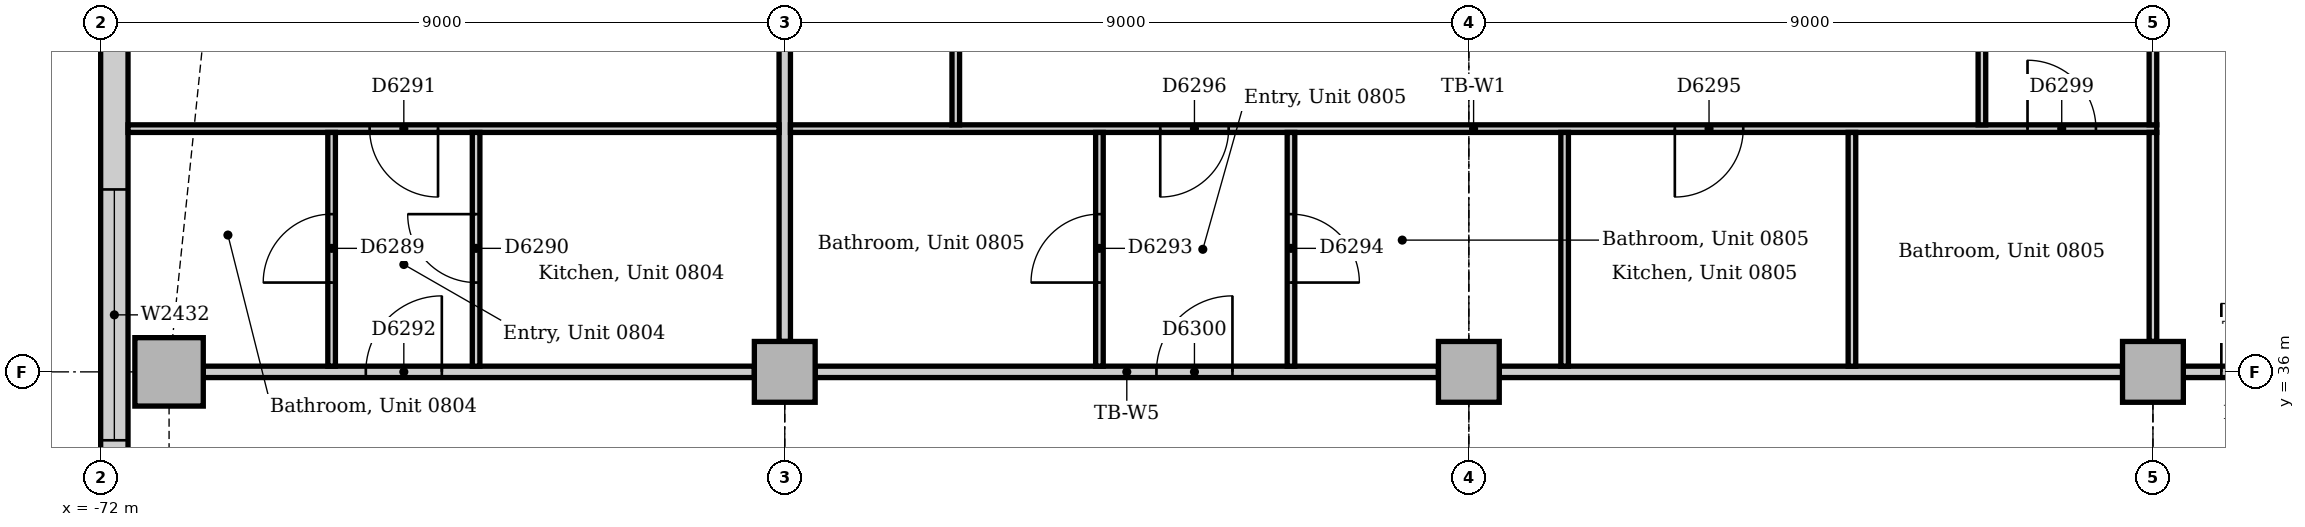
"""IFC4 building model, lengths in metres.
Left out: names, types, materials, properties, quantities, classifications, styles, units other than length and angle.
Written with IfcOpenShell. Run it as: python <this file> out.ifc"""

import sys

from ifc_helpers import new_model, si_unit, direction, frame, frame_2d, origin, origin_2d, place, context, subcontext, project, spatial, rectangle, extrude, element, fill, save


model = new_model("IFC4")
c1 = context("Model", 3, precision=1e-05, world=origin(), true_north=direction((0.0, 1.0)))
c2 = subcontext(c1, "Body", "Model", "MODEL_VIEW")
j1 = project(units=[si_unit("LENGTHUNIT", "METRE"), si_unit("PLANEANGLEUNIT", "RADIAN")], contexts=[c1])
p1 = place(None, origin())
s1 = spatial("IfcSite", under=j1, at=p1, CompositionType="ELEMENT")
p2 = place(p1, origin())
s2 = spatial("IfcBuilding", under=s1, at=p2, CompositionType="ELEMENT")
p3 = place(p2, frame((0.0, 0.0, 38.0)))
s3 = spatial("IfcBuildingStorey", under=s2, at=p3, CompositionType="ELEMENT", Elevation=38.0)
p4 = place(p3, frame((-71.1, 36.0, 0.0), z_axis=(0.0, 0.0, 1.0), x_axis=(1.0, 0.0, 0.0)))
e1 = element("IfcColumn", 1, at=p4, inside=s3, PredefinedType="COLUMN", context=c2, shape_type="SweptSolid", body=[
    extrude(rectangle(XDim=0.9, YDim=0.9, at=origin_2d()), origin(), (0.0, 0.0, 1.0), 3.85),
])
for number, where, z_axis, x_axis in (
    (2, (-63.0, 36.0, 0.0), (0.0, 0.0, 1.0), (1.0, 0.0, 0.0)),
    (3, (-54.0, 36.0, 0.0), (0.0, 0.0, 1.0), (1.0, 0.0, 0.0)),
    (4, (-45.0, 36.0, 0.0), (0.0, 0.0, 1.0), (1.0, 0.0, 0.0)),
):
    element("IfcColumn", number, at=place(p3, frame(where, z_axis=z_axis, x_axis=x_axis)), inside=s3, PredefinedType="COLUMN", context=c2, shape_type="SweptSolid", body=[
        extrude(rectangle(XDim=0.8, YDim=0.8, at=origin_2d()), origin(), (0.0, 0.0, 1.0), 3.85),
    ])
p5 = place(p3, frame((-71.82, 40.757, 0.0), z_axis=(0.0, 0.0, 1.0), x_axis=(0.0, -1.0, 0.0)))
e5 = element("IfcWall", 5, at=p5, inside=s3, PredefinedType="STANDARD", context=c2, shape_type="SweptSolid", body=[
    extrude(rectangle(XDim=26.015, YDim=0.36, at=frame_2d((13.007, 0.0))), origin(), (0.0, 0.0, 1.0), 3.85),
])
p6 = place(p5, frame((2.357, 0.0, 0.9)))
e6 = element("IfcOpeningElement", 6, at=p6, cuts=e5, PredefinedType="OPENING", context=c2, shape_type="SweptSolid", body=[
    extrude(rectangle(XDim=3.3, YDim=1.6, at=frame_2d((1.65, 0.8))), frame((0.0, 0.19, 0.0), z_axis=(0.0, -1.0, 0.0), x_axis=(1.0, 0.0, 0.0)), (0.0, 0.0, 1.0), 0.38),
])
p7 = place(p5, frame((7.057, 0.0, 0.9)))
e7 = element("IfcOpeningElement", 7, at=p7, cuts=e5, PredefinedType="OPENING", context=c2, shape_type="SweptSolid", body=[
    extrude(rectangle(XDim=3.3, YDim=1.6, at=frame_2d((1.65, 0.8))), frame((0.0, 0.19, 0.0), z_axis=(0.0, -1.0, 0.0), x_axis=(1.0, 0.0, 0.0)), (0.0, 0.0, 1.0), 0.38),
])
p8 = place(p5, frame((11.357, 0.0, 0.9)))
e8 = element("IfcOpeningElement", 8, at=p8, cuts=e5, PredefinedType="OPENING", context=c2, shape_type="SweptSolid", body=[
    extrude(rectangle(XDim=3.3, YDim=1.6, at=frame_2d((1.65, 0.8))), frame((0.0, 0.19, 0.0), z_axis=(0.0, -1.0, 0.0), x_axis=(1.0, 0.0, 0.0)), (0.0, 0.0, 1.0), 0.38),
])
p9 = place(p5, frame((15.857, 0.0, 0.9)))
e9 = element("IfcOpeningElement", 9, at=p9, cuts=e5, PredefinedType="OPENING", context=c2, shape_type="SweptSolid", body=[
    extrude(rectangle(XDim=3.3, YDim=1.6, at=frame_2d((1.65, 0.8))), frame((0.0, 0.19, 0.0), z_axis=(0.0, -1.0, 0.0), x_axis=(1.0, 0.0, 0.0)), (0.0, 0.0, 1.0), 0.38),
])
p10 = place(p5, frame((20.957, 0.0, 0.9)))
e10 = element("IfcOpeningElement", 10, at=p10, cuts=e5, PredefinedType="OPENING", context=c2, shape_type="SweptSolid", body=[
    extrude(rectangle(XDim=3.3, YDim=1.6, at=frame_2d((1.65, 0.8))), frame((0.0, 0.19, 0.0), z_axis=(0.0, -1.0, 0.0), x_axis=(1.0, 0.0, 0.0)), (0.0, 0.0, 1.0), 0.38),
])
p11 = place(p3, frame((-44.6, 36.0, 0.0), z_axis=(0.0, 0.0, 1.0), x_axis=(1.0, 0.0, 0.0)))
e11 = element("IfcWall", 11, at=p11, inside=s3, PredefinedType="PARTITIONING", context=c2, shape_type="SweptSolid", body=[
    extrude(rectangle(XDim=1.875, YDim=0.15, at=frame_2d((0.938, 0.0))), origin(), (0.0, 0.0, 1.0), 3.602),
])
p12 = place(p11, frame((0.5, 0.0, 0.0)))
e12 = element("IfcOpeningElement", 12, at=p12, cuts=e11, PredefinedType="OPENING", context=c2, shape_type="SweptSolid", body=[
    extrude(rectangle(XDim=0.9, YDim=2.1, at=frame_2d((0.45, 1.05))), frame((0.0, 0.085, 0.0), z_axis=(0.0, -1.0, 0.0), x_axis=(1.0, 0.0, 0.0)), (0.0, 0.0, 1.0), 0.17),
])
p13 = place(p3, frame((-53.6, 36.0, 0.0), z_axis=(0.0, 0.0, 1.0), x_axis=(1.0, 0.0, 0.0)))
e13 = element("IfcWall", 13, at=p13, inside=s3, PredefinedType="PARTITIONING", context=c2, shape_type="SweptSolid", body=[
    extrude(rectangle(XDim=8.2, YDim=0.15, at=frame_2d((4.1, 0.0))), origin(), (0.0, 0.0, 1.0), 3.15),
])
p14 = place(p3, frame((-62.6, 36.0, 0.0), z_axis=(0.0, 0.0, 1.0), x_axis=(1.0, 0.0, 0.0)))
e14 = element("IfcWall", 14, at=p14, inside=s3, PredefinedType="PARTITIONING", context=c2, shape_type="SweptSolid", body=[
    extrude(rectangle(XDim=8.2, YDim=0.15, at=frame_2d((4.1, 0.0))), origin(), (0.0, 0.0, 1.0), 3.15),
])
p15 = place(p14, frame((4.49, 0.0, 0.0)))
e15 = element("IfcOpeningElement", 15, at=p15, cuts=e14, PredefinedType="OPENING", context=c2, shape_type="SweptSolid", body=[
    extrude(rectangle(XDim=1.0, YDim=2.1, at=frame_2d((0.5, 1.05))), frame((0.0, 0.085, 0.0), z_axis=(0.0, -1.0, 0.0), x_axis=(1.0, 0.0, 0.0)), (0.0, 0.0, 1.0), 0.17),
])
p16 = place(p3, frame((-70.65, 36.0, 0.0), z_axis=(0.0, 0.0, 1.0), x_axis=(1.0, 0.0, 0.0)))
e16 = element("IfcWall", 16, at=p16, inside=s3, PredefinedType="PARTITIONING", context=c2, shape_type="SweptSolid", body=[
    extrude(rectangle(XDim=7.25, YDim=0.15, at=frame_2d((3.625, 0.0))), origin(), (0.0, 0.0, 1.0), 3.15),
])
p17 = place(p16, frame((2.138, 0.0, 0.0)))
e17 = element("IfcOpeningElement", 17, at=p17, cuts=e16, PredefinedType="OPENING", context=c2, shape_type="SweptSolid", body=[
    extrude(rectangle(XDim=1.0, YDim=2.1, at=frame_2d((0.5, 1.05))), frame((0.0, 0.085, 0.0), z_axis=(0.0, -1.0, 0.0), x_axis=(1.0, 0.0, 0.0)), (0.0, 0.0, 1.0), 0.17),
])
p18 = place(p3, frame((-63.0, 36.4, 0.0), z_axis=(0.0, 0.0, 1.0), x_axis=(0.0, 1.0, 0.0)))
e18 = element("IfcWall", 18, at=p18, inside=s3, PredefinedType="PARTITIONING", context=c2, shape_type="SweptSolid", body=[
    extrude(rectangle(XDim=7.25, YDim=0.15, at=frame_2d((3.625, 0.0))), origin(), (0.0, 0.0, 1.0), 3.158),
])
p19 = place(p3, frame((-62.925, 39.2, 0.0), z_axis=(0.0, 0.0, 1.0), x_axis=(1.0, 0.0, 0.0)))
e19 = element("IfcWall", 19, at=p19, inside=s3, PredefinedType="PARTITIONING", context=c2, shape_type="SweptSolid", body=[
    extrude(rectangle(XDim=17.975, YDim=0.1, at=frame_2d((8.988, 0.0))), origin(), (0.0, 0.0, 1.0), 3.85),
])
p20 = place(p19, frame((11.635, 0.0, 0.0)))
e20 = element("IfcOpeningElement", 20, at=p20, cuts=e19, PredefinedType="OPENING", context=c2, shape_type="SweptSolid", body=[
    extrude(rectangle(XDim=0.9, YDim=2.1, at=frame_2d((0.45, 1.05))), frame((0.0, 0.06, 0.0), z_axis=(0.0, -1.0, 0.0), x_axis=(1.0, 0.0, 0.0)), (0.0, 0.0, 1.0), 0.12),
])
p21 = place(p19, frame((4.865, 0.0, 0.0)))
e21 = element("IfcOpeningElement", 21, at=p21, cuts=e19, PredefinedType="OPENING", context=c2, shape_type="SweptSolid", body=[
    extrude(rectangle(XDim=0.9, YDim=2.1, at=frame_2d((0.45, 1.05))), frame((0.0, 0.06, 0.0), z_axis=(0.0, -1.0, 0.0), x_axis=(1.0, 0.0, 0.0)), (0.0, 0.0, 1.0), 0.12),
])
p22 = place(p19, frame((16.275, 0.0, 0.0)))
e22 = element("IfcOpeningElement", 22, at=p22, cuts=e19, PredefinedType="OPENING", context=c2, shape_type="SweptSolid", body=[
    extrude(rectangle(XDim=0.9, YDim=2.1, at=frame_2d((0.45, 1.05))), frame((0.0, 0.06, 0.0), z_axis=(0.0, -1.0, 0.0), x_axis=(1.0, 0.0, 0.0)), (0.0, 0.0, 1.0), 0.12),
])
p23 = place(p3, frame((-71.64, 39.2, 0.0), z_axis=(0.0, 0.0, 1.0), x_axis=(1.0, 0.0, 0.0)))
e23 = element("IfcWall", 23, at=p23, inside=s3, PredefinedType="PARTITIONING", context=c2, shape_type="SweptSolid", body=[
    extrude(rectangle(XDim=8.565, YDim=0.1, at=frame_2d((4.282, 0.0))), origin(), (0.0, 0.0, 1.0), 3.85),
])
p24 = place(p23, frame((3.178, 0.0, 0.0)))
e24 = element("IfcOpeningElement", 24, at=p24, cuts=e23, PredefinedType="OPENING", context=c2, shape_type="SweptSolid", body=[
    extrude(rectangle(XDim=0.9, YDim=2.1, at=frame_2d((0.45, 1.05))), frame((0.0, 0.06, 0.0), z_axis=(0.0, -1.0, 0.0), x_axis=(1.0, 0.0, 0.0)), (0.0, 0.0, 1.0), 0.12),
])
p25 = place(p3, frame((-45.0, 39.25, 0.0), z_axis=(0.0, 0.0, 1.0), x_axis=(0.0, 1.0, 0.0)))
e25 = element("IfcWall", 25, at=p25, inside=s3, PredefinedType="PARTITIONING", context=c2, shape_type="SweptSolid", body=[
    extrude(rectangle(XDim=4.4, YDim=0.1, at=frame_2d((2.2, 0.0))), origin(), (0.0, 0.0, 1.0), 3.158),
])
p26 = place(p3, frame((-45.0, 36.4, 0.0), z_axis=(0.0, 0.0, 1.0), x_axis=(0.0, 1.0, 0.0)))
e26 = element("IfcWall", 26, at=p26, inside=s3, PredefinedType="PARTITIONING", context=c2, shape_type="SweptSolid", body=[
    extrude(rectangle(XDim=2.75, YDim=0.1, at=frame_2d((1.375, 0.0))), origin(), (0.0, 0.0, 1.0), 3.158),
])
p27 = place(p3, frame((-60.75, 39.25, 0.0), z_axis=(0.0, 0.0, 1.0), x_axis=(0.0, 1.0, 0.0)))
e27 = element("IfcWall", 27, at=p27, inside=s3, PredefinedType="PARTITIONING", context=c2, shape_type="SweptSolid", body=[
    extrude(rectangle(XDim=5.39, YDim=0.1, at=frame_2d((2.695, 0.0))), origin(), (0.0, 0.0, 1.0), 3.85),
])
p28 = place(p27, frame((2.25, 0.0, 0.0)))
e28 = element("IfcOpeningElement", 28, at=p28, cuts=e27, PredefinedType="OPENING", context=c2, shape_type="SweptSolid", body=[
    extrude(rectangle(XDim=0.9, YDim=2.1, at=frame_2d((0.45, 1.05))), frame((0.0, 0.06, 0.0), z_axis=(0.0, -1.0, 0.0), x_axis=(1.0, 0.0, 0.0)), (0.0, 0.0, 1.0), 0.12),
])
p29 = place(p3, frame((-47.25, 39.25, 0.0), z_axis=(0.0, 0.0, 1.0), x_axis=(0.0, 1.0, 0.0)))
e29 = element("IfcWall", 29, at=p29, inside=s3, PredefinedType="PARTITIONING", context=c2, shape_type="SweptSolid", body=[
    extrude(rectangle(XDim=5.39, YDim=0.1, at=frame_2d((2.695, 0.0))), origin(), (0.0, 0.0, 1.0), 3.85),
])
p30 = place(p29, frame((2.25, 0.0, 0.0)))
e30 = element("IfcOpeningElement", 30, at=p30, cuts=e29, PredefinedType="OPENING", context=c2, shape_type="SweptSolid", body=[
    extrude(rectangle(XDim=0.9, YDim=2.1, at=frame_2d((0.45, 1.05))), frame((0.0, 0.06, 0.0), z_axis=(0.0, -1.0, 0.0), x_axis=(1.0, 0.0, 0.0)), (0.0, 0.0, 1.0), 0.12),
])
p31 = place(p3, frame((-68.962, 36.075, 0.0), z_axis=(0.0, 0.0, 1.0), x_axis=(0.0, 1.0, 0.0)))
e31 = element("IfcWall", 31, at=p31, inside=s3, PredefinedType="PARTITIONING", context=c2, shape_type="SweptSolid", body=[
    extrude(rectangle(XDim=3.075, YDim=0.1, at=frame_2d((1.538, 0.0))), origin(), (0.0, 0.0, 1.0), 3.85),
])
p32 = place(p31, frame((1.1, 0.0, 0.0)))
e32 = element("IfcOpeningElement", 32, at=p32, cuts=e31, PredefinedType="OPENING", context=c2, shape_type="SweptSolid", body=[
    extrude(rectangle(XDim=0.9, YDim=2.1, at=frame_2d((0.45, 1.05))), frame((0.0, 0.06, 0.0), z_axis=(0.0, -1.0, 0.0), x_axis=(1.0, 0.0, 0.0)), (0.0, 0.0, 1.0), 0.12),
])
p33 = place(p3, frame((-67.061, 36.075, 0.0), z_axis=(0.0, 0.0, 1.0), x_axis=(0.0, 1.0, 0.0)))
e33 = element("IfcWall", 33, at=p33, inside=s3, PredefinedType="PARTITIONING", context=c2, shape_type="SweptSolid", body=[
    extrude(rectangle(XDim=3.075, YDim=0.1, at=frame_2d((1.538, 0.0))), origin(), (0.0, 0.0, 1.0), 3.85),
])
p34 = place(p33, frame((1.1, 0.0, 0.0)))
e34 = element("IfcOpeningElement", 34, at=p34, cuts=e33, PredefinedType="OPENING", context=c2, shape_type="SweptSolid", body=[
    extrude(rectangle(XDim=0.9, YDim=2.1, at=frame_2d((0.45, 1.05))), frame((0.0, 0.06, 0.0), z_axis=(0.0, -1.0, 0.0), x_axis=(1.0, 0.0, 0.0)), (0.0, 0.0, 1.0), 0.12),
])
p35 = place(p3, frame((-58.86, 36.075, 0.0), z_axis=(0.0, 0.0, 1.0), x_axis=(0.0, 1.0, 0.0)))
e35 = element("IfcWall", 35, at=p35, inside=s3, PredefinedType="PARTITIONING", context=c2, shape_type="SweptSolid", body=[
    extrude(rectangle(XDim=3.075, YDim=0.1, at=frame_2d((1.538, 0.0))), origin(), (0.0, 0.0, 1.0), 3.85),
])
p36 = place(p35, frame((1.1, 0.0, 0.0)))
e36 = element("IfcOpeningElement", 36, at=p36, cuts=e35, PredefinedType="OPENING", context=c2, shape_type="SweptSolid", body=[
    extrude(rectangle(XDim=0.9, YDim=2.1, at=frame_2d((0.45, 1.05))), frame((0.0, 0.06, 0.0), z_axis=(0.0, -1.0, 0.0), x_axis=(1.0, 0.0, 0.0)), (0.0, 0.0, 1.0), 0.12),
])
p37 = place(p3, frame((-56.34, 36.075, 0.0), z_axis=(0.0, 0.0, 1.0), x_axis=(0.0, 1.0, 0.0)))
e37 = element("IfcWall", 37, at=p37, inside=s3, PredefinedType="PARTITIONING", context=c2, shape_type="SweptSolid", body=[
    extrude(rectangle(XDim=3.075, YDim=0.1, at=frame_2d((1.538, 0.0))), origin(), (0.0, 0.0, 1.0), 3.85),
])
p38 = place(p37, frame((1.1, 0.0, 0.0)))
e38 = element("IfcOpeningElement", 38, at=p38, cuts=e37, PredefinedType="OPENING", context=c2, shape_type="SweptSolid", body=[
    extrude(rectangle(XDim=0.9, YDim=2.1, at=frame_2d((0.45, 1.05))), frame((0.0, 0.06, 0.0), z_axis=(0.0, -1.0, 0.0), x_axis=(1.0, 0.0, 0.0)), (0.0, 0.0, 1.0), 0.12),
])
for number, where, z_axis, x_axis in (
    (39, (-52.74, 36.075, 0.0), (0.0, 0.0, 1.0), (0.0, 1.0, 0.0)),
    (40, (-48.96, 36.075, 0.0), (0.0, 0.0, 1.0), (0.0, 1.0, 0.0)),
):
    element("IfcWall", number, at=place(p3, frame(where, z_axis=z_axis, x_axis=x_axis)), inside=s3, PredefinedType="PARTITIONING", context=c2, shape_type="SweptSolid", body=[
        extrude(rectangle(XDim=3.075, YDim=0.1, at=frame_2d((1.538, 0.0))), origin(), (0.0, 0.0, 1.0), 3.85),
    ])
p39 = place(p6, origin())
e41 = element("IfcWindow", 41, at=p39, inside=s3, PartitioningType="SINGLE_PANEL", PredefinedType="WINDOW", context=c2, shape_type="SweptSolid", body=[
    extrude(rectangle(XDim=3.3, YDim=1.6, at=frame_2d((1.65, 0.8))), frame((0.0, 0.13, 0.0), z_axis=(0.0, -1.0, 0.0), x_axis=(1.0, 0.0, 0.0)), (0.0, 0.0, 1.0), 0.06),
])
fill(e6, e41)
p40 = place(p12, origin())
e42 = element("IfcDoor", 42, at=p40, inside=s3, OperationType="SINGLE_SWING_LEFT", PredefinedType="DOOR", context=c2, shape_type="SweptSolid", body=[
    extrude(rectangle(XDim=0.9, YDim=2.1, at=frame_2d((0.45, 1.05))), frame((0.0, 0.025, 0.0), z_axis=(0.0, -1.0, 0.0), x_axis=(1.0, 0.0, 0.0)), (0.0, 0.0, 1.0), 0.05),
])
fill(e12, e42)
p41 = place(p32, origin())
e43 = element("IfcDoor", 43, at=p41, inside=s3, OperationType="SINGLE_SWING_LEFT", PredefinedType="DOOR", context=c2, shape_type="SweptSolid", body=[
    extrude(rectangle(XDim=0.9, YDim=2.1, at=frame_2d((0.45, 1.05))), frame((0.0, 0.025, 0.0), z_axis=(0.0, -1.0, 0.0), x_axis=(1.0, 0.0, 0.0)), (0.0, 0.0, 1.0), 0.05),
])
fill(e32, e43)
p42 = place(p34, origin())
e44 = element("IfcDoor", 44, at=p42, inside=s3, OperationType="SINGLE_SWING_RIGHT", PredefinedType="DOOR", context=c2, shape_type="SweptSolid", body=[
    extrude(rectangle(XDim=0.9, YDim=2.1, at=frame_2d((0.45, 1.05))), frame((0.0, 0.025, 0.0), z_axis=(0.0, -1.0, 0.0), x_axis=(1.0, 0.0, 0.0)), (0.0, 0.0, 1.0), 0.05),
])
fill(e34, e44)
p43 = place(p24, frame((0.9, 0.0, 0.0), z_axis=(0.0, 0.0, 1.0), x_axis=(-1.0, 0.0, 0.0)))
e45 = element("IfcDoor", 45, at=p43, inside=s3, OperationType="SINGLE_SWING_LEFT", PredefinedType="DOOR", context=c2, shape_type="SweptSolid", body=[
    extrude(rectangle(XDim=0.9, YDim=2.1, at=frame_2d((0.45, 1.05))), frame((0.0, 0.025, 0.0), z_axis=(0.0, -1.0, 0.0), x_axis=(1.0, 0.0, 0.0)), (0.0, 0.0, 1.0), 0.05),
])
fill(e24, e45)
p44 = place(p17, origin())
e46 = element("IfcDoor", 46, at=p44, inside=s3, OperationType="SINGLE_SWING_RIGHT", PredefinedType="DOOR", context=c2, shape_type="SweptSolid", body=[
    extrude(rectangle(XDim=1.0, YDim=2.1, at=frame_2d((0.5, 1.05))), frame((0.0, 0.025, 0.0), z_axis=(0.0, -1.0, 0.0), x_axis=(1.0, 0.0, 0.0)), (0.0, 0.0, 1.0), 0.05),
])
fill(e17, e46)
p45 = place(p36, origin())
e47 = element("IfcDoor", 47, at=p45, inside=s3, OperationType="SINGLE_SWING_LEFT", PredefinedType="DOOR", context=c2, shape_type="SweptSolid", body=[
    extrude(rectangle(XDim=0.9, YDim=2.1, at=frame_2d((0.45, 1.05))), frame((0.0, 0.025, 0.0), z_axis=(0.0, -1.0, 0.0), x_axis=(1.0, 0.0, 0.0)), (0.0, 0.0, 1.0), 0.05),
])
fill(e36, e47)
p46 = place(p38, frame((0.9, 0.0, 0.0), z_axis=(0.0, 0.0, 1.0), x_axis=(-1.0, 0.0, 0.0)))
e48 = element("IfcDoor", 48, at=p46, inside=s3, OperationType="SINGLE_SWING_RIGHT", PredefinedType="DOOR", context=c2, shape_type="SweptSolid", body=[
    extrude(rectangle(XDim=0.9, YDim=2.1, at=frame_2d((0.45, 1.05))), frame((0.0, 0.025, 0.0), z_axis=(0.0, -1.0, 0.0), x_axis=(1.0, 0.0, 0.0)), (0.0, 0.0, 1.0), 0.05),
])
fill(e38, e48)
p47 = place(p20, frame((0.9, 0.0, 0.0), z_axis=(0.0, 0.0, 1.0), x_axis=(-1.0, 0.0, 0.0)))
e49 = element("IfcDoor", 49, at=p47, inside=s3, OperationType="SINGLE_SWING_RIGHT", PredefinedType="DOOR", context=c2, shape_type="SweptSolid", body=[
    extrude(rectangle(XDim=0.9, YDim=2.1, at=frame_2d((0.45, 1.05))), frame((0.0, 0.025, 0.0), z_axis=(0.0, -1.0, 0.0), x_axis=(1.0, 0.0, 0.0)), (0.0, 0.0, 1.0), 0.05),
])
fill(e20, e49)
p48 = place(p21, frame((0.9, 0.0, 0.0), z_axis=(0.0, 0.0, 1.0), x_axis=(-1.0, 0.0, 0.0)))
e50 = element("IfcDoor", 50, at=p48, inside=s3, OperationType="SINGLE_SWING_RIGHT", PredefinedType="DOOR", context=c2, shape_type="SweptSolid", body=[
    extrude(rectangle(XDim=0.9, YDim=2.1, at=frame_2d((0.45, 1.05))), frame((0.0, 0.025, 0.0), z_axis=(0.0, -1.0, 0.0), x_axis=(1.0, 0.0, 0.0)), (0.0, 0.0, 1.0), 0.05),
])
fill(e21, e50)
p49 = place(p22, origin())
e51 = element("IfcDoor", 51, at=p49, inside=s3, OperationType="SINGLE_SWING_LEFT", PredefinedType="DOOR", context=c2, shape_type="SweptSolid", body=[
    extrude(rectangle(XDim=0.9, YDim=2.1, at=frame_2d((0.45, 1.05))), frame((0.0, 0.025, 0.0), z_axis=(0.0, -1.0, 0.0), x_axis=(1.0, 0.0, 0.0)), (0.0, 0.0, 1.0), 0.05),
])
fill(e22, e51)
p50 = place(p15, origin())
e52 = element("IfcDoor", 52, at=p50, inside=s3, OperationType="SINGLE_SWING_RIGHT", PredefinedType="DOOR", context=c2, shape_type="SweptSolid", body=[
    extrude(rectangle(XDim=1.0, YDim=2.1, at=frame_2d((0.5, 1.05))), frame((0.0, 0.025, 0.0), z_axis=(0.0, -1.0, 0.0), x_axis=(1.0, 0.0, 0.0)), (0.0, 0.0, 1.0), 0.05),
])
fill(e15, e52)
save(model, sys.argv[1])
